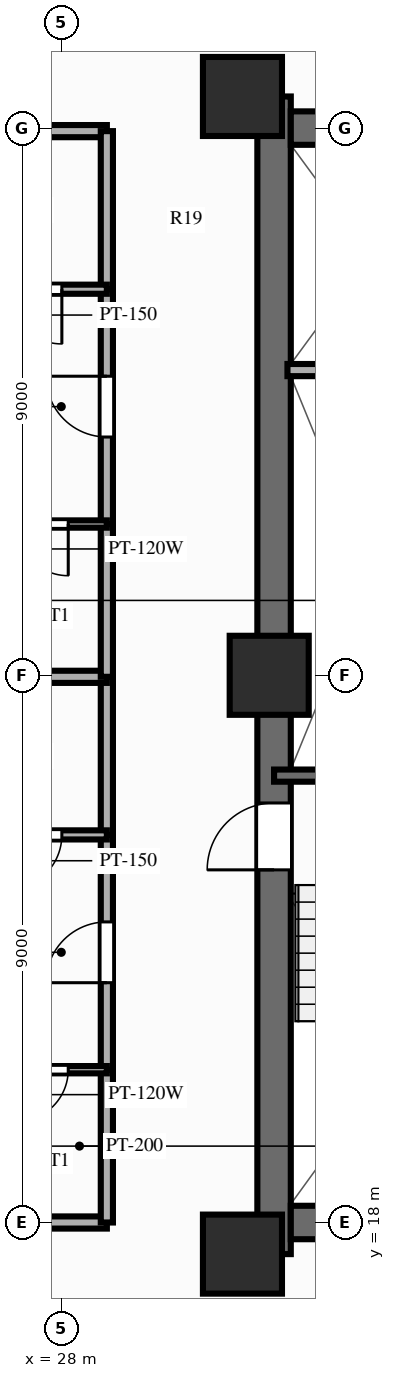
"""IFC4 building model, lengths in metres.
Left out: names, types, materials, properties, quantities, classifications, styles, units other than length and angle.
Written with IfcOpenShell. Run it as: python <this file> out.ifc"""

import sys

from ifc_helpers import new_model, si_unit, direction, frame, frame_2d, origin, origin_2d, place, context, subcontext, project, spatial, rectangle, extrude, source, transform, mapped, element, fill, save


model = new_model("IFC4")
c1 = context("Model", 3, precision=1e-05, world=origin(), true_north=direction((0.0, 1.0)))
c2 = subcontext(c1, "Body", "Model", "MODEL_VIEW")
j1 = project(units=[si_unit("LENGTHUNIT", "METRE"), si_unit("PLANEANGLEUNIT", "RADIAN")], contexts=[c1])
p1 = place(None, origin())
s1 = spatial("IfcSite", under=j1, at=p1, CompositionType="ELEMENT")
p2 = place(p1, origin())
s2 = spatial("IfcBuilding", under=s1, at=p2, CompositionType="ELEMENT")
p3 = place(p2, frame((0.0, 0.0, 80.85)))
s3 = spatial("IfcBuildingStorey", under=s2, at=p3, CompositionType="ELEMENT", Elevation=80.85)
p4 = place(p3, frame((31.5, 17.48, 0.0), z_axis=(0.0, 0.0, 1.0), x_axis=(0.0, 1.0, 0.0)))
e1 = element("IfcWall", 1, at=p4, inside=s3, PredefinedType="SHEAR", context=c2, shape_type="SweptSolid", body=[
    extrude(rectangle(XDim=19.04, YDim=0.55, at=frame_2d((9.52, 0.0))), origin(), (0.0, 0.0, 1.0), 3.0),
])
p5 = place(p4, frame((6.32, 0.0, 0.0)))
e2 = element("IfcOpeningElement", 2, at=p5, cuts=e1, PredefinedType="OPENING", context=c2, shape_type="SweptSolid", body=[
    extrude(rectangle(XDim=1.1, YDim=2.15, at=frame_2d((0.55, 1.075))), frame((0.0, 0.287, 0.0), z_axis=(0.0, -1.0, 0.0), x_axis=(1.0, 0.0, 0.0)), (0.0, 0.0, 1.0), 0.574),
])
p6 = place(p3, frame((31.775, 18.0, 0.0), z_axis=(0.0, 0.0, 1.0), x_axis=(1.0, 0.0, 0.0)))
e3 = element("IfcWall", 3, at=p6, inside=s3, PredefinedType="SHEAR", context=c2, shape_type="SweptSolid", body=[
    extrude(rectangle(XDim=12.45, YDim=0.55, at=frame_2d((6.225, 0.0))), origin(), (0.0, 0.0, 1.0), 3.0),
])
p7 = place(p3, frame((31.775, 36.0, 0.0), z_axis=(0.0, 0.0, 1.0), x_axis=(1.0, 0.0, 0.0)))
e4 = element("IfcWall", 4, at=p7, inside=s3, PredefinedType="SHEAR", context=c2, shape_type="SweptSolid", body=[
    extrude(rectangle(XDim=12.45, YDim=0.55, at=frame_2d((6.225, 0.0))), origin(), (0.0, 0.0, 1.0), 3.0),
])
p8 = place(p7, frame((5.175, 0.0, 0.0), z_axis=(0.0, 0.0, 1.0), x_axis=(-1.0, 0.0, 0.0)))
e5 = element("IfcOpeningElement", 5, at=p8, cuts=e4, PredefinedType="OPENING", context=c2, shape_type="SweptSolid", body=[
    extrude(rectangle(XDim=1.4, YDim=2.15, at=frame_2d((0.7, 1.075))), frame((0.0, 0.287, 0.0), z_axis=(0.0, -1.0, 0.0), x_axis=(1.0, 0.0, 0.0)), (0.0, 0.0, 1.0), 0.574),
])
m1 = source(origin(), c2, "Body", "SweptSolid", [
    extrude(rectangle(XDim=1.3, YDim=1.3, at=origin_2d()), origin(), (0.0, 0.0, 1.0), 3.0),
])
for number, where, z_axis, x_axis in (
    (6, (30.98, 17.48, 0.0), (0.0, 0.0, 1.0), (1.0, 0.0, 0.0)),
    (7, (30.98, 36.52, 0.0), (0.0, 0.0, 1.0), (1.0, 0.0, 0.0)),
    (8, (31.42, 27.0, 0.0), (0.0, 0.0, 1.0), (1.0, 0.0, 0.0)),
):
    element("IfcColumn", number, at=place(p3, frame(where, z_axis=z_axis, x_axis=x_axis)), inside=s3, PredefinedType="COLUMN", context=c2, shape_type="MappedRepresentation", body=[
        mapped(m1, transform((0.0, 0.0, 0.0), scale=1.0)),
    ])
p9 = place(p3, frame((31.5, 25.35, 0.0), z_axis=(0.0, 0.0, 1.0), x_axis=(1.0, 0.0, 0.0)))
e9 = element("IfcWall", 9, at=p9, inside=s3, PredefinedType="SOLIDWALL", context=c2, shape_type="SweptSolid", body=[
    extrude(rectangle(XDim=3.93, YDim=0.2, at=frame_2d((1.965, 0.0))), origin(), (0.0, 0.0, 1.0), 2.79),
])
p10 = place(p3, frame((31.72, 32.02, 0.0), z_axis=(0.0, 0.0, 1.0), x_axis=(1.0, 0.0, 0.0)))
e10 = element("IfcWall", 10, at=p10, inside=s3, PredefinedType="PARTITIONING", context=c2, shape_type="SweptSolid", body=[
    extrude(rectangle(XDim=2.8, YDim=0.2, at=frame_2d((1.4, 0.0))), origin(), (0.0, 0.0, 1.0), 2.79),
])
for number, where, z_axis, x_axis in (
    (11, (28.75, 18.0, 0.0), (0.0, 0.0, 1.0), (-1.0, 0.0, 0.0)),
    (12, (28.75, 35.95, 0.0), (0.0, 0.0, 1.0), (-1.0, 0.0, 0.0)),
):
    element("IfcWall", number, at=place(p3, frame(where, z_axis=z_axis, x_axis=x_axis)), inside=s3, PredefinedType="PARTITIONING", context=c2, shape_type="SweptSolid", body=[
        extrude(rectangle(XDim=16.6, YDim=0.2, at=frame_2d((8.3, 0.0))), origin(), (0.0, 0.0, 1.0), 2.34),
    ])
p11 = place(p3, frame((28.75, 18.0, 0.0), z_axis=(0.0, 0.0, 1.0), x_axis=(0.0, 1.0, 0.0)))
e13 = element("IfcWall", 13, at=p11, inside=s3, PredefinedType="PARTITIONING", context=c2, shape_type="SweptSolid", body=[
    extrude(rectangle(XDim=2.513, YDim=0.2, at=frame_2d((1.256, 0.0))), origin(), (0.0, 0.0, 1.0), 2.79),
])
p12 = place(p3, frame((28.75, 20.513, 0.0), z_axis=(0.0, 0.0, 1.0), x_axis=(0.0, 1.0, 0.0)))
e14 = element("IfcWall", 14, at=p12, inside=s3, PredefinedType="PARTITIONING", context=c2, shape_type="SweptSolid", body=[
    extrude(rectangle(XDim=3.862, YDim=0.2, at=frame_2d((1.931, 0.0))), origin(), (0.0, 0.0, 1.0), 2.79),
])
p13 = place(p12, frame((1.431, 0.0, 0.0)))
e15 = element("IfcOpeningElement", 15, at=p13, cuts=e14, PredefinedType="OPENING", context=c2, shape_type="SweptSolid", body=[
    extrude(rectangle(XDim=1.0, YDim=2.15, at=frame_2d((0.5, 1.075))), frame((0.0, 0.112, 0.0), z_axis=(0.0, -1.0, 0.0), x_axis=(1.0, 0.0, 0.0)), (0.0, 0.0, 1.0), 0.224),
])
p14 = place(p3, frame((28.75, 24.375, 0.0), z_axis=(0.0, 0.0, 1.0), x_axis=(0.0, 1.0, 0.0)))
e16 = element("IfcWall", 16, at=p14, inside=s3, PredefinedType="PARTITIONING", context=c2, shape_type="SweptSolid", body=[
    extrude(rectangle(XDim=2.6, YDim=0.2, at=frame_2d((1.3, 0.0))), origin(), (0.0, 0.0, 1.0), 2.79),
])
p15 = place(p3, frame((28.75, 20.513, 0.0), z_axis=(0.0, 0.0, 1.0), x_axis=(-1.0, 0.0, 0.0)))
e17 = element("IfcWall", 17, at=p15, inside=s3, PredefinedType="PARTITIONING", context=c2, shape_type="SweptSolid", body=[
    extrude(rectangle(XDim=2.12, YDim=0.12, at=frame_2d((1.06, 0.0))), origin(), (0.0, 0.0, 1.0), 2.79),
])
p16 = place(p15, frame((0.635, 0.0, 0.0)))
e18 = element("IfcOpeningElement", 18, at=p16, cuts=e17, PredefinedType="OPENING", context=c2, shape_type="SweptSolid", body=[
    extrude(rectangle(XDim=0.85, YDim=2.05, at=frame_2d((0.425, 1.025))), frame((0.0, 0.072, 0.0), z_axis=(0.0, -1.0, 0.0), x_axis=(1.0, 0.0, 0.0)), (0.0, 0.0, 1.0), 0.144),
])
p17 = place(p3, frame((28.75, 24.375, 0.0), z_axis=(0.0, 0.0, 1.0), x_axis=(-1.0, 0.0, 0.0)))
e19 = element("IfcWall", 19, at=p17, inside=s3, PredefinedType="PARTITIONING", context=c2, shape_type="SweptSolid", body=[
    extrude(rectangle(XDim=2.38, YDim=0.15, at=frame_2d((1.19, 0.0))), origin(), (0.0, 0.0, 1.0), 2.79),
])
p18 = place(p17, frame((0.74, 0.0, 0.0)))
e20 = element("IfcOpeningElement", 20, at=p18, cuts=e19, PredefinedType="OPENING", context=c2, shape_type="SweptSolid", body=[
    extrude(rectangle(XDim=0.9, YDim=2.1, at=frame_2d((0.45, 1.05))), frame((0.0, 0.087, 0.0), z_axis=(0.0, -1.0, 0.0), x_axis=(1.0, 0.0, 0.0)), (0.0, 0.0, 1.0), 0.174),
])
p19 = place(p3, frame((28.75, 26.975, 0.0), z_axis=(0.0, 0.0, 1.0), x_axis=(-1.0, 0.0, 0.0)))
e21 = element("IfcWall", 21, at=p19, inside=s3, PredefinedType="PARTITIONING", context=c2, shape_type="SweptSolid", body=[
    extrude(rectangle(XDim=16.6, YDim=0.2, at=frame_2d((8.3, 0.0))), origin(), (0.0, 0.0, 1.0), 2.79),
])
p20 = place(p3, frame((28.75, 26.975, 0.0), z_axis=(0.0, 0.0, 1.0), x_axis=(0.0, 1.0, 0.0)))
e22 = element("IfcWall", 22, at=p20, inside=s3, PredefinedType="PARTITIONING", context=c2, shape_type="SweptSolid", body=[
    extrude(rectangle(XDim=2.513, YDim=0.2, at=frame_2d((1.256, 0.0))), origin(), (0.0, 0.0, 1.0), 2.79),
])
p21 = place(p3, frame((28.75, 29.488, 0.0), z_axis=(0.0, 0.0, 1.0), x_axis=(0.0, 1.0, 0.0)))
e23 = element("IfcWall", 23, at=p21, inside=s3, PredefinedType="PARTITIONING", context=c2, shape_type="SweptSolid", body=[
    extrude(rectangle(XDim=3.862, YDim=0.2, at=frame_2d((1.931, 0.0))), origin(), (0.0, 0.0, 1.0), 2.79),
])
p22 = place(p21, frame((1.431, 0.0, 0.0)))
e24 = element("IfcOpeningElement", 24, at=p22, cuts=e23, PredefinedType="OPENING", context=c2, shape_type="SweptSolid", body=[
    extrude(rectangle(XDim=1.0, YDim=2.15, at=frame_2d((0.5, 1.075))), frame((0.0, 0.112, 0.0), z_axis=(0.0, -1.0, 0.0), x_axis=(1.0, 0.0, 0.0)), (0.0, 0.0, 1.0), 0.224),
])
p23 = place(p3, frame((28.75, 33.35, 0.0), z_axis=(0.0, 0.0, 1.0), x_axis=(0.0, 1.0, 0.0)))
e25 = element("IfcWall", 25, at=p23, inside=s3, PredefinedType="PARTITIONING", context=c2, shape_type="SweptSolid", body=[
    extrude(rectangle(XDim=2.6, YDim=0.2, at=frame_2d((1.3, 0.0))), origin(), (0.0, 0.0, 1.0), 2.79),
])
p24 = place(p3, frame((28.75, 29.488, 0.0), z_axis=(0.0, 0.0, 1.0), x_axis=(-1.0, 0.0, 0.0)))
e26 = element("IfcWall", 26, at=p24, inside=s3, PredefinedType="PARTITIONING", context=c2, shape_type="SweptSolid", body=[
    extrude(rectangle(XDim=2.12, YDim=0.12, at=frame_2d((1.06, 0.0))), origin(), (0.0, 0.0, 1.0), 2.79),
])
p25 = place(p24, frame((0.635, 0.0, 0.0)))
e27 = element("IfcOpeningElement", 27, at=p25, cuts=e26, PredefinedType="OPENING", context=c2, shape_type="SweptSolid", body=[
    extrude(rectangle(XDim=0.85, YDim=2.05, at=frame_2d((0.425, 1.025))), frame((0.0, 0.072, 0.0), z_axis=(0.0, -1.0, 0.0), x_axis=(1.0, 0.0, 0.0)), (0.0, 0.0, 1.0), 0.144),
])
p26 = place(p3, frame((28.75, 33.35, 0.0), z_axis=(0.0, 0.0, 1.0), x_axis=(-1.0, 0.0, 0.0)))
e28 = element("IfcWall", 28, at=p26, inside=s3, PredefinedType="PARTITIONING", context=c2, shape_type="SweptSolid", body=[
    extrude(rectangle(XDim=2.38, YDim=0.15, at=frame_2d((1.19, 0.0))), origin(), (0.0, 0.0, 1.0), 2.79),
])
p27 = place(p26, frame((0.74, 0.0, 0.0)))
e29 = element("IfcOpeningElement", 29, at=p27, cuts=e28, PredefinedType="OPENING", context=c2, shape_type="SweptSolid", body=[
    extrude(rectangle(XDim=0.9, YDim=2.1, at=frame_2d((0.45, 1.05))), frame((0.0, 0.087, 0.0), z_axis=(0.0, -1.0, 0.0), x_axis=(1.0, 0.0, 0.0)), (0.0, 0.0, 1.0), 0.174),
])
m2 = source(origin(), c2, "Body", "SweptSolid", [
    extrude(rectangle(XDim=1.1, YDim=2.15, at=frame_2d((0.55, 1.075))), frame((0.0, 0.025, 0.0), z_axis=(0.0, -1.0, 0.0), x_axis=(1.0, 0.0, 0.0)), (0.0, 0.0, 1.0), 0.05),
])
p28 = place(p5, origin())
e30 = element("IfcDoor", 30, at=p28, inside=s3, OperationType="SINGLE_SWING_LEFT", PredefinedType="DOOR", context=c2, shape_type="MappedRepresentation", body=[
    mapped(m2, transform((0.0, 0.0, 0.0), scale=1.0)),
])
fill(e2, e30)
m3 = source(origin(), c2, "Body", "SweptSolid", [
    extrude(rectangle(XDim=1.0, YDim=2.15, at=frame_2d((0.5, 1.075))), frame((0.0, 0.025, 0.0), z_axis=(0.0, -1.0, 0.0), x_axis=(1.0, 0.0, 0.0)), (0.0, 0.0, 1.0), 0.05),
])
p29 = place(p13, origin())
e31 = element("IfcDoor", 31, at=p29, inside=s3, OperationType="SINGLE_SWING_LEFT", PredefinedType="DOOR", context=c2, shape_type="MappedRepresentation", body=[
    mapped(m3, transform((0.0, 0.0, 0.0), scale=1.0)),
])
fill(e15, e31)
m4 = source(origin(), c2, "Body", "SweptSolid", [
    extrude(rectangle(XDim=0.85, YDim=2.05, at=frame_2d((0.425, 1.025))), frame((0.0, 0.025, 0.0), z_axis=(0.0, -1.0, 0.0), x_axis=(1.0, 0.0, 0.0)), (0.0, 0.0, 1.0), 0.05),
])
p30 = place(p16, origin())
e32 = element("IfcDoor", 32, at=p30, inside=s3, OperationType="SINGLE_SWING_RIGHT", PredefinedType="DOOR", context=c2, shape_type="MappedRepresentation", body=[
    mapped(m4, transform((0.0, 0.0, 0.0), scale=1.0)),
])
fill(e18, e32)
m5 = source(origin(), c2, "Body", "SweptSolid", [
    extrude(rectangle(XDim=0.9, YDim=2.1, at=frame_2d((0.45, 1.05))), frame((0.0, 0.025, 0.0), z_axis=(0.0, -1.0, 0.0), x_axis=(1.0, 0.0, 0.0)), (0.0, 0.0, 1.0), 0.05),
])
p31 = place(p18, origin())
e33 = element("IfcDoor", 33, at=p31, inside=s3, OperationType="SINGLE_SWING_RIGHT", PredefinedType="DOOR", context=c2, shape_type="MappedRepresentation", body=[
    mapped(m5, transform((0.0, 0.0, 0.0), scale=1.0)),
])
fill(e20, e33)
p32 = place(p22, origin())
e34 = element("IfcDoor", 34, at=p32, inside=s3, OperationType="SINGLE_SWING_RIGHT", PredefinedType="DOOR", context=c2, shape_type="MappedRepresentation", body=[
    mapped(m3, transform((0.0, 0.0, 0.0), scale=1.0)),
])
fill(e24, e34)
p33 = place(p25, origin())
e35 = element("IfcDoor", 35, at=p33, inside=s3, OperationType="SINGLE_SWING_LEFT", PredefinedType="DOOR", context=c2, shape_type="MappedRepresentation", body=[
    mapped(m4, transform((0.0, 0.0, 0.0), scale=1.0)),
])
fill(e27, e35)
p34 = place(p27, origin())
e36 = element("IfcDoor", 36, at=p34, inside=s3, OperationType="SINGLE_SWING_LEFT", PredefinedType="DOOR", context=c2, shape_type="MappedRepresentation", body=[
    mapped(m5, transform((0.0, 0.0, 0.0), scale=1.0)),
])
fill(e29, e36)
save(model, sys.argv[1])
